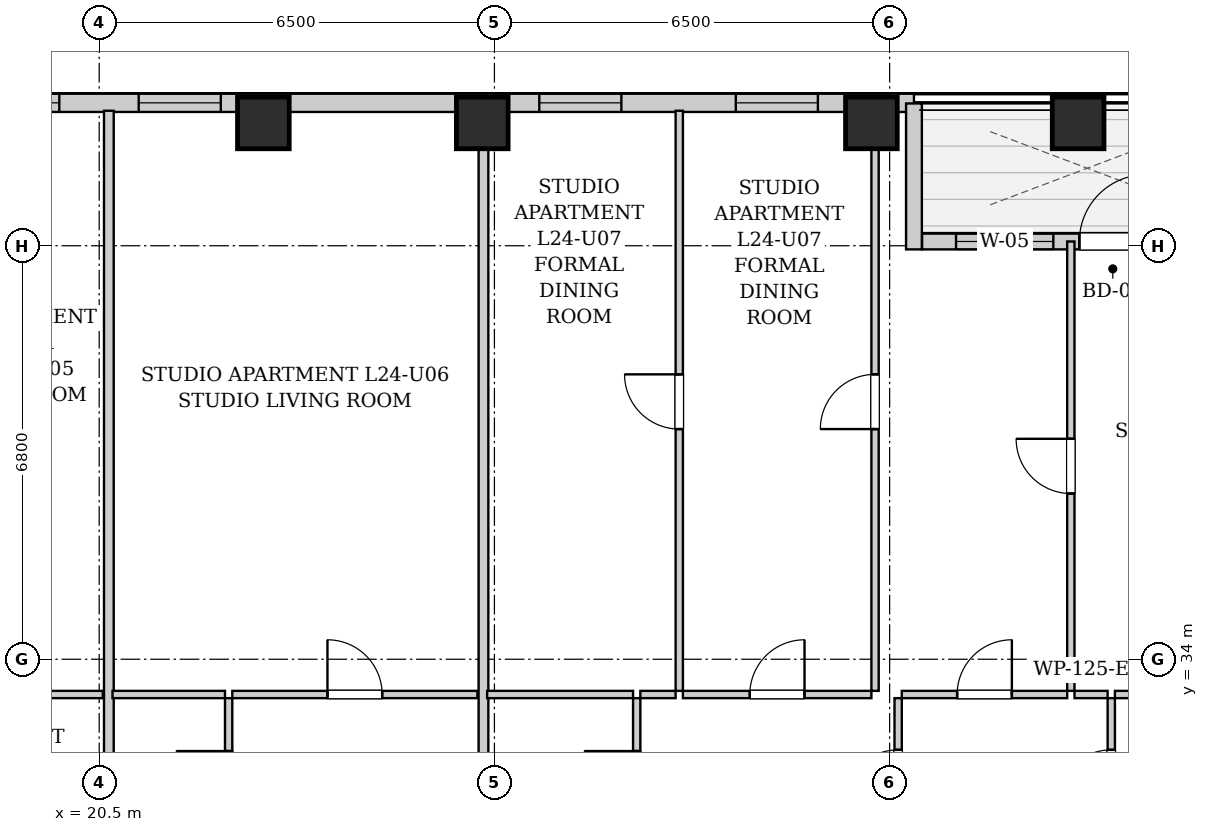
"""IFC4 building model, lengths in metres.
Left out: names, types, materials, properties, quantities, classifications, styles, units other than length and angle.
Written with IfcOpenShell. Run it as: python <this file> out.ifc"""

import sys

from ifc_helpers import new_model, si_unit, direction, frame, frame_2d, origin, origin_2d, place, context, subcontext, project, spatial, rectangle, extrude, element, fill, save


model = new_model("IFC4")
c1 = context("Model", 3, precision=1e-05, world=origin(), true_north=direction((0.0, 1.0)))
c2 = subcontext(c1, "Body", "Model", "MODEL_VIEW")
j1 = project(units=[si_unit("LENGTHUNIT", "METRE"), si_unit("PLANEANGLEUNIT", "RADIAN")], contexts=[c1])
p1 = place(None, origin())
s1 = spatial("IfcSite", under=j1, at=p1, CompositionType="ELEMENT")
p2 = place(p1, origin())
s2 = spatial("IfcBuilding", under=s1, at=p2, CompositionType="ELEMENT")
p3 = place(p2, frame((0.0, 0.0, 87.9)))
s3 = spatial("IfcBuildingStorey", under=s2, at=p3, CompositionType="ELEMENT", Elevation=87.9)
for number, where, z_axis, x_axis in (
    (1, (23.2, 42.82, 0.0), (0.0, 0.0, 1.0), (1.0, 0.0, 0.0)),
    (2, (26.8, 42.82, 0.0), (0.0, 0.0, 1.0), (1.0, 0.0, 0.0)),
    (3, (33.2, 42.82, 0.0), (0.0, 0.0, 1.0), (1.0, 0.0, 0.0)),
    (4, (36.6, 42.82, 0.0), (0.0, 0.0, 1.0), (1.0, 0.0, 0.0)),
):
    element("IfcColumn", number, at=place(p3, frame(where, z_axis=z_axis, x_axis=x_axis)), inside=s3, PredefinedType="COLUMN", context=c2, shape_type="SweptSolid", body=[
        extrude(rectangle(XDim=0.85, YDim=0.85, at=origin_2d()), origin(), (0.0, 0.0, 1.0), 3.2),
    ])
p4 = place(p3, frame((10.0, 43.15, 0.0), z_axis=(0.0, 0.0, 1.0), x_axis=(1.0, 0.0, 0.0)))
e5 = element("IfcWall", 5, at=p4, inside=s3, PredefinedType="SOLIDWALL", context=c2, shape_type="SweptSolid", body=[
    extrude(rectangle(XDim=23.9, YDim=0.3, at=frame_2d((11.95, 0.0))), origin(), (0.0, 0.0, 1.0), 2.94),
])
p5 = place(p4, frame((5.337, 0.0, 0.55)))
e6 = element("IfcOpeningElement", 6, at=p5, cuts=e5, PredefinedType="OPENING", context=c2, shape_type="SweptSolid", body=[
    extrude(rectangle(XDim=1.35, YDim=1.2, at=frame_2d((0.675, 0.6))), frame((0.0, 0.16, 0.0), z_axis=(0.0, -1.0, 0.0), x_axis=(1.0, 0.0, 0.0)), (0.0, 0.0, 1.0), 0.32),
])
p6 = place(p4, frame((8.494, 0.0, 0.55)))
e7 = element("IfcOpeningElement", 7, at=p6, cuts=e5, PredefinedType="OPENING", context=c2, shape_type="SweptSolid", body=[
    extrude(rectangle(XDim=1.35, YDim=1.2, at=frame_2d((0.675, 0.6))), frame((0.0, 0.16, 0.0), z_axis=(0.0, -1.0, 0.0), x_axis=(1.0, 0.0, 0.0)), (0.0, 0.0, 1.0), 0.32),
])
p7 = place(p4, frame((11.15, 0.0, 0.55)))
e8 = element("IfcOpeningElement", 8, at=p7, cuts=e5, PredefinedType="OPENING", context=c2, shape_type="SweptSolid", body=[
    extrude(rectangle(XDim=1.35, YDim=1.2, at=frame_2d((0.675, 0.6))), frame((0.0, 0.16, 0.0), z_axis=(0.0, -1.0, 0.0), x_axis=(1.0, 0.0, 0.0)), (0.0, 0.0, 1.0), 0.32),
])
p8 = place(p4, frame((17.738, 0.0, 0.55)))
e9 = element("IfcOpeningElement", 9, at=p8, cuts=e5, PredefinedType="OPENING", context=c2, shape_type="SweptSolid", body=[
    extrude(rectangle(XDim=1.35, YDim=1.2, at=frame_2d((0.675, 0.6))), frame((0.0, 0.16, 0.0), z_axis=(0.0, -1.0, 0.0), x_axis=(1.0, 0.0, 0.0)), (0.0, 0.0, 1.0), 0.32),
])
p9 = place(p4, frame((20.97, 0.0, 0.55)))
e10 = element("IfcOpeningElement", 10, at=p9, cuts=e5, PredefinedType="OPENING", context=c2, shape_type="SweptSolid", body=[
    extrude(rectangle(XDim=1.35, YDim=1.2, at=frame_2d((0.675, 0.6))), frame((0.0, 0.16, 0.0), z_axis=(0.0, -1.0, 0.0), x_axis=(1.0, 0.0, 0.0)), (0.0, 0.0, 1.0), 0.32),
])
p10 = place(p3, frame((33.9, 43.14, 0.0), z_axis=(0.0, 0.0, 1.0), x_axis=(0.0, -1.0, 0.0)))
e11 = element("IfcWall", 11, at=p10, inside=s3, PredefinedType="SOLIDWALL", context=c2, shape_type="SweptSolid", body=[
    extrude(rectangle(XDim=2.4, YDim=0.26, at=frame_2d((1.2, 0.0))), origin(), (0.0, 0.0, 1.0), 2.94),
])
p11 = place(p3, frame((34.034, 40.87, 0.0), z_axis=(0.0, 0.0, 1.0), x_axis=(1.0, 0.0, 0.0)))
e12 = element("IfcWall", 12, at=p11, inside=s3, PredefinedType="SOLIDWALL", context=c2, shape_type="SweptSolid", body=[
    extrude(rectangle(XDim=5.432, YDim=0.26, at=frame_2d((2.716, 0.0))), origin(), (0.0, 0.0, 1.0), 2.94),
])
p12 = place(p11, frame((2.586, 0.0, 0.0)))
e13 = element("IfcOpeningElement", 13, at=p12, cuts=e12, PredefinedType="OPENING", context=c2, shape_type="SweptSolid", body=[
    extrude(rectangle(XDim=1.1, YDim=2.0, at=frame_2d((0.55, 1.0))), frame((0.0, 0.14, 0.0), z_axis=(0.0, -1.0, 0.0), x_axis=(1.0, 0.0, 0.0)), (0.0, 0.0, 1.0), 0.28),
])
p13 = place(p11, frame((0.558, 0.0, 0.85)))
e14 = element("IfcOpeningElement", 14, at=p13, cuts=e12, PredefinedType="OPENING", context=c2, shape_type="SweptSolid", body=[
    extrude(rectangle(XDim=1.6, YDim=1.65, at=frame_2d((0.8, 0.825))), frame((0.0, 0.14, 0.0), z_axis=(0.0, -1.0, 0.0), x_axis=(1.0, 0.0, 0.0)), (0.0, 0.0, 1.0), 0.28),
])
p14 = place(p3, frame((17.86, 33.42, 0.0), z_axis=(0.0, 0.0, 1.0), x_axis=(1.0, 0.0, 0.0)))
e15 = element("IfcWall", 15, at=p14, inside=s3, PredefinedType="PARTITIONING", context=c2, shape_type="SweptSolid", body=[
    extrude(rectangle(XDim=2.699, YDim=0.12, at=frame_2d((1.35, 0.0))), origin(), (0.0, 0.0, 1.0), 2.94),
])
p15 = place(p14, frame((0.899, 0.0, 0.0)))
e16 = element("IfcOpeningElement", 16, at=p15, cuts=e15, PredefinedType="OPENING", context=c2, shape_type="SweptSolid", body=[
    extrude(rectangle(XDim=0.9, YDim=2.05, at=frame_2d((0.45, 1.025))), frame((0.0, 0.07, 0.0), z_axis=(0.0, -1.0, 0.0), x_axis=(1.0, 0.0, 0.0)), (0.0, 0.0, 1.0), 0.14),
])
p16 = place(p3, frame((20.659, 30.76, 0.0), z_axis=(0.0, 0.0, 1.0), x_axis=(0.0, 1.0, 0.0)))
e17 = element("IfcWall", 17, at=p16, inside=s3, PredefinedType="PARTITIONING", context=c2, shape_type="SweptSolid", body=[
    extrude(rectangle(XDim=12.26, YDim=0.16, at=frame_2d((6.13, 0.0))), origin(), (0.0, 0.0, 1.0), 2.94),
])
p17 = place(p3, frame((22.629, 30.76, 0.0), z_axis=(0.0, 0.0, 1.0), x_axis=(0.0, 1.0, 0.0)))
e18 = element("IfcWall", 18, at=p17, inside=s3, PredefinedType="PARTITIONING", context=c2, shape_type="SweptSolid", body=[
    extrude(rectangle(XDim=2.6, YDim=0.12, at=frame_2d((1.3, 0.0))), origin(), (0.0, 0.0, 1.0), 2.94),
])
p18 = place(p17, frame((0.87, 0.0, 0.0)))
e19 = element("IfcOpeningElement", 19, at=p18, cuts=e18, PredefinedType="OPENING", context=c2, shape_type="SweptSolid", body=[
    extrude(rectangle(XDim=0.86, YDim=2.05, at=frame_2d((0.43, 1.025))), frame((0.0, 0.07, 0.0), z_axis=(0.0, -1.0, 0.0), x_axis=(1.0, 0.0, 0.0)), (0.0, 0.0, 1.0), 0.14),
])
p19 = place(p3, frame((20.719, 33.42, 0.0), z_axis=(0.0, 0.0, 1.0), x_axis=(1.0, 0.0, 0.0)))
e20 = element("IfcWall", 20, at=p19, inside=s3, PredefinedType="PARTITIONING", context=c2, shape_type="SweptSolid", body=[
    extrude(rectangle(XDim=1.85, YDim=0.12, at=frame_2d((0.925, 0.0))), origin(), (0.0, 0.0, 1.0), 2.94),
])
p20 = place(p3, frame((22.689, 33.42, 0.0), z_axis=(0.0, 0.0, 1.0), x_axis=(1.0, 0.0, 0.0)))
e21 = element("IfcWall", 21, at=p20, inside=s3, PredefinedType="PARTITIONING", context=c2, shape_type="SweptSolid", body=[
    extrude(rectangle(XDim=4.031, YDim=0.12, at=frame_2d((2.016, 0.0))), origin(), (0.0, 0.0, 1.0), 2.94),
])
p21 = place(p20, frame((1.565, 0.0, 0.0)))
e22 = element("IfcOpeningElement", 22, at=p21, cuts=e21, PredefinedType="OPENING", context=c2, shape_type="SweptSolid", body=[
    extrude(rectangle(XDim=0.9, YDim=2.05, at=frame_2d((0.45, 1.025))), frame((0.0, 0.07, 0.0), z_axis=(0.0, -1.0, 0.0), x_axis=(1.0, 0.0, 0.0)), (0.0, 0.0, 1.0), 0.14),
])
p22 = place(p3, frame((26.82, 30.76, 0.0), z_axis=(0.0, 0.0, 1.0), x_axis=(0.0, 1.0, 0.0)))
e23 = element("IfcWall", 23, at=p22, inside=s3, PredefinedType="PARTITIONING", context=c2, shape_type="SweptSolid", body=[
    extrude(rectangle(XDim=12.26, YDim=0.16, at=frame_2d((6.13, 0.0))), origin(), (0.0, 0.0, 1.0), 2.94),
])
p23 = place(p3, frame((29.34, 30.76, 0.0), z_axis=(0.0, 0.0, 1.0), x_axis=(0.0, 1.0, 0.0)))
e24 = element("IfcWall", 24, at=p23, inside=s3, PredefinedType="PARTITIONING", context=c2, shape_type="SweptSolid", body=[
    extrude(rectangle(XDim=2.6, YDim=0.12, at=frame_2d((1.3, 0.0))), origin(), (0.0, 0.0, 1.0), 2.94),
])
p24 = place(p23, frame((0.87, 0.0, 0.0)))
e25 = element("IfcOpeningElement", 25, at=p24, cuts=e24, PredefinedType="OPENING", context=c2, shape_type="SweptSolid", body=[
    extrude(rectangle(XDim=0.86, YDim=2.05, at=frame_2d((0.43, 1.025))), frame((0.0, 0.07, 0.0), z_axis=(0.0, -1.0, 0.0), x_axis=(1.0, 0.0, 0.0)), (0.0, 0.0, 1.0), 0.14),
])
p25 = place(p3, frame((26.88, 33.42, 0.0), z_axis=(0.0, 0.0, 1.0), x_axis=(1.0, 0.0, 0.0)))
e26 = element("IfcWall", 26, at=p25, inside=s3, PredefinedType="PARTITIONING", context=c2, shape_type="SweptSolid", body=[
    extrude(rectangle(XDim=2.4, YDim=0.12, at=frame_2d((1.2, 0.0))), origin(), (0.0, 0.0, 1.0), 2.94),
])
p26 = place(p3, frame((33.64, 30.76, 0.0), z_axis=(0.0, 0.0, 1.0), x_axis=(0.0, 1.0, 0.0)))
e27 = element("IfcWall", 27, at=p26, inside=s3, PredefinedType="PARTITIONING", context=c2, shape_type="SweptSolid", body=[
    extrude(rectangle(XDim=2.6, YDim=0.12, at=frame_2d((1.3, 0.0))), origin(), (0.0, 0.0, 1.0), 2.94),
])
p27 = place(p26, frame((0.85, 0.0, 0.0)))
e28 = element("IfcOpeningElement", 28, at=p27, cuts=e27, PredefinedType="OPENING", context=c2, shape_type="SweptSolid", body=[
    extrude(rectangle(XDim=0.9, YDim=2.05, at=frame_2d((0.45, 1.025))), frame((0.0, 0.07, 0.0), z_axis=(0.0, -1.0, 0.0), x_axis=(1.0, 0.0, 0.0)), (0.0, 0.0, 1.0), 0.14),
])
p28 = place(p3, frame((29.4, 33.42, 0.0), z_axis=(0.0, 0.0, 1.0), x_axis=(1.0, 0.0, 0.0)))
e29 = element("IfcWall", 29, at=p28, inside=s3, PredefinedType="PARTITIONING", context=c2, shape_type="SweptSolid", body=[
    extrude(rectangle(XDim=0.58, YDim=0.12, at=frame_2d((0.29, 0.0))), origin(), (0.0, 0.0, 1.0), 2.94),
])
p29 = place(p3, frame((30.1, 33.42, 0.0), z_axis=(0.0, 0.0, 1.0), x_axis=(1.0, 0.0, 0.0)))
e30 = element("IfcWall", 30, at=p29, inside=s3, PredefinedType="PARTITIONING", context=c2, shape_type="SweptSolid", body=[
    extrude(rectangle(XDim=3.1, YDim=0.12, at=frame_2d((1.55, 0.0))), origin(), (0.0, 0.0, 1.0), 2.94),
])
p30 = place(p29, frame((1.1, 0.0, 0.0)))
e31 = element("IfcOpeningElement", 31, at=p30, cuts=e30, PredefinedType="OPENING", context=c2, shape_type="SweptSolid", body=[
    extrude(rectangle(XDim=0.9, YDim=2.05, at=frame_2d((0.45, 1.025))), frame((0.0, 0.07, 0.0), z_axis=(0.0, -1.0, 0.0), x_axis=(1.0, 0.0, 0.0)), (0.0, 0.0, 1.0), 0.14),
])
p31 = place(p3, frame((37.145, 30.76, 0.0), z_axis=(0.0, 0.0, 1.0), x_axis=(0.0, 1.0, 0.0)))
e32 = element("IfcWall", 32, at=p31, inside=s3, PredefinedType="PARTITIONING", context=c2, shape_type="SweptSolid", body=[
    extrude(rectangle(XDim=2.6, YDim=0.12, at=frame_2d((1.3, 0.0))), origin(), (0.0, 0.0, 1.0), 2.94),
])
p32 = place(p31, frame((0.85, 0.0, 0.0)))
e33 = element("IfcOpeningElement", 33, at=p32, cuts=e32, PredefinedType="OPENING", context=c2, shape_type="SweptSolid", body=[
    extrude(rectangle(XDim=0.9, YDim=2.05, at=frame_2d((0.45, 1.025))), frame((0.0, 0.07, 0.0), z_axis=(0.0, -1.0, 0.0), x_axis=(1.0, 0.0, 0.0)), (0.0, 0.0, 1.0), 0.14),
])
p33 = place(p3, frame((33.7, 33.42, 0.0), z_axis=(0.0, 0.0, 1.0), x_axis=(1.0, 0.0, 0.0)))
e34 = element("IfcWall", 34, at=p33, inside=s3, PredefinedType="PARTITIONING", context=c2, shape_type="SweptSolid", body=[
    extrude(rectangle(XDim=2.72, YDim=0.12, at=frame_2d((1.36, 0.0))), origin(), (0.0, 0.0, 1.0), 2.94),
])
p34 = place(p33, frame((0.91, 0.0, 0.0)))
e35 = element("IfcOpeningElement", 35, at=p34, cuts=e34, PredefinedType="OPENING", context=c2, shape_type="SweptSolid", body=[
    extrude(rectangle(XDim=0.9, YDim=2.05, at=frame_2d((0.45, 1.025))), frame((0.0, 0.07, 0.0), z_axis=(0.0, -1.0, 0.0), x_axis=(1.0, 0.0, 0.0)), (0.0, 0.0, 1.0), 0.14),
])
p35 = place(p3, frame((36.54, 33.42, 0.0), z_axis=(0.0, 0.0, 1.0), x_axis=(1.0, 0.0, 0.0)))
e36 = element("IfcWall", 36, at=p35, inside=s3, PredefinedType="PARTITIONING", context=c2, shape_type="SweptSolid", body=[
    extrude(rectangle(XDim=0.545, YDim=0.12, at=frame_2d((0.272, 0.0))), origin(), (0.0, 0.0, 1.0), 2.94),
])
p36 = place(p3, frame((37.205, 33.42, 0.0), z_axis=(0.0, 0.0, 1.0), x_axis=(1.0, 0.0, 0.0)))
e37 = element("IfcWall", 37, at=p36, inside=s3, PredefinedType="PARTITIONING", context=c2, shape_type="SweptSolid", body=[
    extrude(rectangle(XDim=3.615, YDim=0.12, at=frame_2d((1.808, 0.0))), origin(), (0.0, 0.0, 1.0), 2.94),
])
p37 = place(p36, frame((1.358, 0.0, 0.0)))
e38 = element("IfcOpeningElement", 38, at=p37, cuts=e37, PredefinedType="OPENING", context=c2, shape_type="SweptSolid", body=[
    extrude(rectangle(XDim=0.9, YDim=2.05, at=frame_2d((0.45, 1.025))), frame((0.0, 0.07, 0.0), z_axis=(0.0, -1.0, 0.0), x_axis=(1.0, 0.0, 0.0)), (0.0, 0.0, 1.0), 0.14),
])
p38 = place(p3, frame((30.04, 33.48, 0.0), z_axis=(0.0, 0.0, 1.0), x_axis=(0.0, 1.0, 0.0)))
e39 = element("IfcWall", 39, at=p38, inside=s3, PredefinedType="PARTITIONING", context=c2, shape_type="SweptSolid", body=[
    extrude(rectangle(XDim=9.54, YDim=0.12, at=frame_2d((4.77, 0.0))), origin(), (0.0, 0.0, 1.0), 2.94),
])
p39 = place(p38, frame((4.305, 0.0, 0.0)))
e40 = element("IfcOpeningElement", 40, at=p39, cuts=e39, PredefinedType="OPENING", context=c2, shape_type="SweptSolid", body=[
    extrude(rectangle(XDim=0.9, YDim=2.05, at=frame_2d((0.45, 1.025))), frame((0.0, 0.07, 0.0), z_axis=(0.0, -1.0, 0.0), x_axis=(1.0, 0.0, 0.0)), (0.0, 0.0, 1.0), 0.14),
])
p40 = place(p3, frame((33.26, 33.48, 0.0), z_axis=(0.0, 0.0, 1.0), x_axis=(0.0, 1.0, 0.0)))
e41 = element("IfcWall", 41, at=p40, inside=s3, PredefinedType="PARTITIONING", context=c2, shape_type="SweptSolid", body=[
    extrude(rectangle(XDim=9.54, YDim=0.12, at=frame_2d((4.77, 0.0))), origin(), (0.0, 0.0, 1.0), 2.309),
])
p41 = place(p40, frame((4.305, 0.0, 0.0)))
e42 = element("IfcOpeningElement", 42, at=p41, cuts=e41, PredefinedType="OPENING", context=c2, shape_type="SweptSolid", body=[
    extrude(rectangle(XDim=0.9, YDim=2.05, at=frame_2d((0.45, 1.025))), frame((0.0, 0.07, 0.0), z_axis=(0.0, -1.0, 0.0), x_axis=(1.0, 0.0, 0.0)), (0.0, 0.0, 1.0), 0.14),
])
p42 = place(p3, frame((36.48, 33.48, 0.0), z_axis=(0.0, 0.0, 1.0), x_axis=(0.0, 1.0, 0.0)))
e43 = element("IfcWall", 43, at=p42, inside=s3, PredefinedType="PARTITIONING", context=c2, shape_type="SweptSolid", body=[
    extrude(rectangle(XDim=7.39, YDim=0.12, at=frame_2d((3.695, 0.0))), origin(), (0.0, 0.0, 1.0), 2.94),
])
p43 = place(p42, frame((3.245, 0.0, 0.0)))
e44 = element("IfcOpeningElement", 44, at=p43, cuts=e43, PredefinedType="OPENING", context=c2, shape_type="SweptSolid", body=[
    extrude(rectangle(XDim=0.9, YDim=2.05, at=frame_2d((0.45, 1.025))), frame((0.0, 0.07, 0.0), z_axis=(0.0, -1.0, 0.0), x_axis=(1.0, 0.0, 0.0)), (0.0, 0.0, 1.0), 0.14),
])
p44 = place(p18, origin())
e45 = element("IfcDoor", 45, at=p44, inside=s3, OperationType="SINGLE_SWING_RIGHT", PredefinedType="DOOR", context=c2, shape_type="SweptSolid", body=[
    extrude(rectangle(XDim=0.86, YDim=2.05, at=frame_2d((0.43, 1.025))), frame((0.0, 0.025, 0.0), z_axis=(0.0, -1.0, 0.0), x_axis=(1.0, 0.0, 0.0)), (0.0, 0.0, 1.0), 0.05),
])
fill(e19, e45)
p45 = place(p21, origin())
e46 = element("IfcDoor", 46, at=p45, inside=s3, OperationType="SINGLE_SWING_LEFT", PredefinedType="DOOR", context=c2, shape_type="SweptSolid", body=[
    extrude(rectangle(XDim=0.9, YDim=2.05, at=frame_2d((0.45, 1.025))), frame((0.0, 0.025, 0.0), z_axis=(0.0, -1.0, 0.0), x_axis=(1.0, 0.0, 0.0)), (0.0, 0.0, 1.0), 0.05),
])
fill(e22, e46)
p46 = place(p24, origin())
e47 = element("IfcDoor", 47, at=p46, inside=s3, OperationType="SINGLE_SWING_RIGHT", PredefinedType="DOOR", context=c2, shape_type="SweptSolid", body=[
    extrude(rectangle(XDim=0.86, YDim=2.05, at=frame_2d((0.43, 1.025))), frame((0.0, 0.025, 0.0), z_axis=(0.0, -1.0, 0.0), x_axis=(1.0, 0.0, 0.0)), (0.0, 0.0, 1.0), 0.05),
])
fill(e25, e47)
p47 = place(p27, origin())
e48 = element("IfcDoor", 48, at=p47, inside=s3, OperationType="SINGLE_SWING_LEFT", PredefinedType="DOOR", context=c2, shape_type="SweptSolid", body=[
    extrude(rectangle(XDim=0.9, YDim=2.05, at=frame_2d((0.45, 1.025))), frame((0.0, 0.025, 0.0), z_axis=(0.0, -1.0, 0.0), x_axis=(1.0, 0.0, 0.0)), (0.0, 0.0, 1.0), 0.05),
])
fill(e28, e48)
p48 = place(p30, origin())
e49 = element("IfcDoor", 49, at=p48, inside=s3, OperationType="SINGLE_SWING_RIGHT", PredefinedType="DOOR", context=c2, shape_type="SweptSolid", body=[
    extrude(rectangle(XDim=0.9, YDim=2.05, at=frame_2d((0.45, 1.025))), frame((0.0, 0.025, 0.0), z_axis=(0.0, -1.0, 0.0), x_axis=(1.0, 0.0, 0.0)), (0.0, 0.0, 1.0), 0.05),
])
fill(e31, e49)
p49 = place(p32, origin())
e50 = element("IfcDoor", 50, at=p49, inside=s3, OperationType="SINGLE_SWING_LEFT", PredefinedType="DOOR", context=c2, shape_type="SweptSolid", body=[
    extrude(rectangle(XDim=0.9, YDim=2.05, at=frame_2d((0.45, 1.025))), frame((0.0, 0.025, 0.0), z_axis=(0.0, -1.0, 0.0), x_axis=(1.0, 0.0, 0.0)), (0.0, 0.0, 1.0), 0.05),
])
fill(e33, e50)
p50 = place(p34, origin())
e51 = element("IfcDoor", 51, at=p50, inside=s3, OperationType="SINGLE_SWING_RIGHT", PredefinedType="DOOR", context=c2, shape_type="SweptSolid", body=[
    extrude(rectangle(XDim=0.9, YDim=2.05, at=frame_2d((0.45, 1.025))), frame((0.0, 0.025, 0.0), z_axis=(0.0, -1.0, 0.0), x_axis=(1.0, 0.0, 0.0)), (0.0, 0.0, 1.0), 0.05),
])
fill(e35, e51)
p51 = place(p39, origin())
e52 = element("IfcDoor", 52, at=p51, inside=s3, OperationType="SINGLE_SWING_RIGHT", PredefinedType="DOOR", context=c2, shape_type="SweptSolid", body=[
    extrude(rectangle(XDim=0.9, YDim=2.05, at=frame_2d((0.45, 1.025))), frame((0.0, 0.025, 0.0), z_axis=(0.0, -1.0, 0.0), x_axis=(1.0, 0.0, 0.0)), (0.0, 0.0, 1.0), 0.05),
])
fill(e40, e52)
p52 = place(p41, origin())
e53 = element("IfcDoor", 53, at=p52, inside=s3, OperationType="SINGLE_SWING_LEFT", PredefinedType="DOOR", context=c2, shape_type="SweptSolid", body=[
    extrude(rectangle(XDim=0.9, YDim=2.05, at=frame_2d((0.45, 1.025))), frame((0.0, 0.025, 0.0), z_axis=(0.0, -1.0, 0.0), x_axis=(1.0, 0.0, 0.0)), (0.0, 0.0, 1.0), 0.05),
])
fill(e42, e53)
p53 = place(p43, origin())
e54 = element("IfcDoor", 54, at=p53, inside=s3, OperationType="SINGLE_SWING_RIGHT", PredefinedType="DOOR", context=c2, shape_type="SweptSolid", body=[
    extrude(rectangle(XDim=0.9, YDim=2.05, at=frame_2d((0.45, 1.025))), frame((0.0, 0.025, 0.0), z_axis=(0.0, -1.0, 0.0), x_axis=(1.0, 0.0, 0.0)), (0.0, 0.0, 1.0), 0.05),
])
fill(e44, e54)
p54 = place(p12, origin())
e55 = element("IfcDoor", 55, at=p54, inside=s3, OperationType="SINGLE_SWING_RIGHT", PredefinedType="DOOR", context=c2, shape_type="SweptSolid", body=[
    extrude(rectangle(XDim=1.1, YDim=2.0, at=frame_2d((0.55, 1.0))), frame((0.0, 0.025, 0.0), z_axis=(0.0, -1.0, 0.0), x_axis=(1.0, 0.0, 0.0)), (0.0, 0.0, 1.0), 0.05),
])
fill(e13, e55)
p55 = place(p6, origin())
e56 = element("IfcWindow", 56, at=p55, inside=s3, PartitioningType="SINGLE_PANEL", PredefinedType="WINDOW", context=c2, shape_type="SweptSolid", body=[
    extrude(rectangle(XDim=1.35, YDim=1.2, at=frame_2d((0.675, 0.6))), frame((0.0, 0.03, 0.0), z_axis=(0.0, -1.0, 0.0), x_axis=(1.0, 0.0, 0.0)), (0.0, 0.0, 1.0), 0.06),
])
fill(e7, e56)
p56 = place(p7, origin())
e57 = element("IfcWindow", 57, at=p56, inside=s3, PartitioningType="SINGLE_PANEL", PredefinedType="WINDOW", context=c2, shape_type="SweptSolid", body=[
    extrude(rectangle(XDim=1.35, YDim=1.2, at=frame_2d((0.675, 0.6))), frame((0.0, 0.03, 0.0), z_axis=(0.0, -1.0, 0.0), x_axis=(1.0, 0.0, 0.0)), (0.0, 0.0, 1.0), 0.06),
])
fill(e8, e57)
p57 = place(p8, origin())
e58 = element("IfcWindow", 58, at=p57, inside=s3, PartitioningType="SINGLE_PANEL", PredefinedType="WINDOW", context=c2, shape_type="SweptSolid", body=[
    extrude(rectangle(XDim=1.35, YDim=1.2, at=frame_2d((0.675, 0.6))), frame((0.0, 0.03, 0.0), z_axis=(0.0, -1.0, 0.0), x_axis=(1.0, 0.0, 0.0)), (0.0, 0.0, 1.0), 0.06),
])
fill(e9, e58)
p58 = place(p9, origin())
e59 = element("IfcWindow", 59, at=p58, inside=s3, PartitioningType="SINGLE_PANEL", PredefinedType="WINDOW", context=c2, shape_type="SweptSolid", body=[
    extrude(rectangle(XDim=1.35, YDim=1.2, at=frame_2d((0.675, 0.6))), frame((0.0, 0.03, 0.0), z_axis=(0.0, -1.0, 0.0), x_axis=(1.0, 0.0, 0.0)), (0.0, 0.0, 1.0), 0.06),
])
fill(e10, e59)
p59 = place(p13, origin())
e60 = element("IfcWindow", 60, at=p59, inside=s3, PartitioningType="DOUBLE_PANEL_VERTICAL", PredefinedType="WINDOW", context=c2, shape_type="SweptSolid", body=[
    extrude(rectangle(XDim=1.6, YDim=1.65, at=frame_2d((0.8, 0.825))), frame((0.0, 0.03, 0.0), z_axis=(0.0, -1.0, 0.0), x_axis=(1.0, 0.0, 0.0)), (0.0, 0.0, 1.0), 0.06),
])
fill(e14, e60)
save(model, sys.argv[1])
